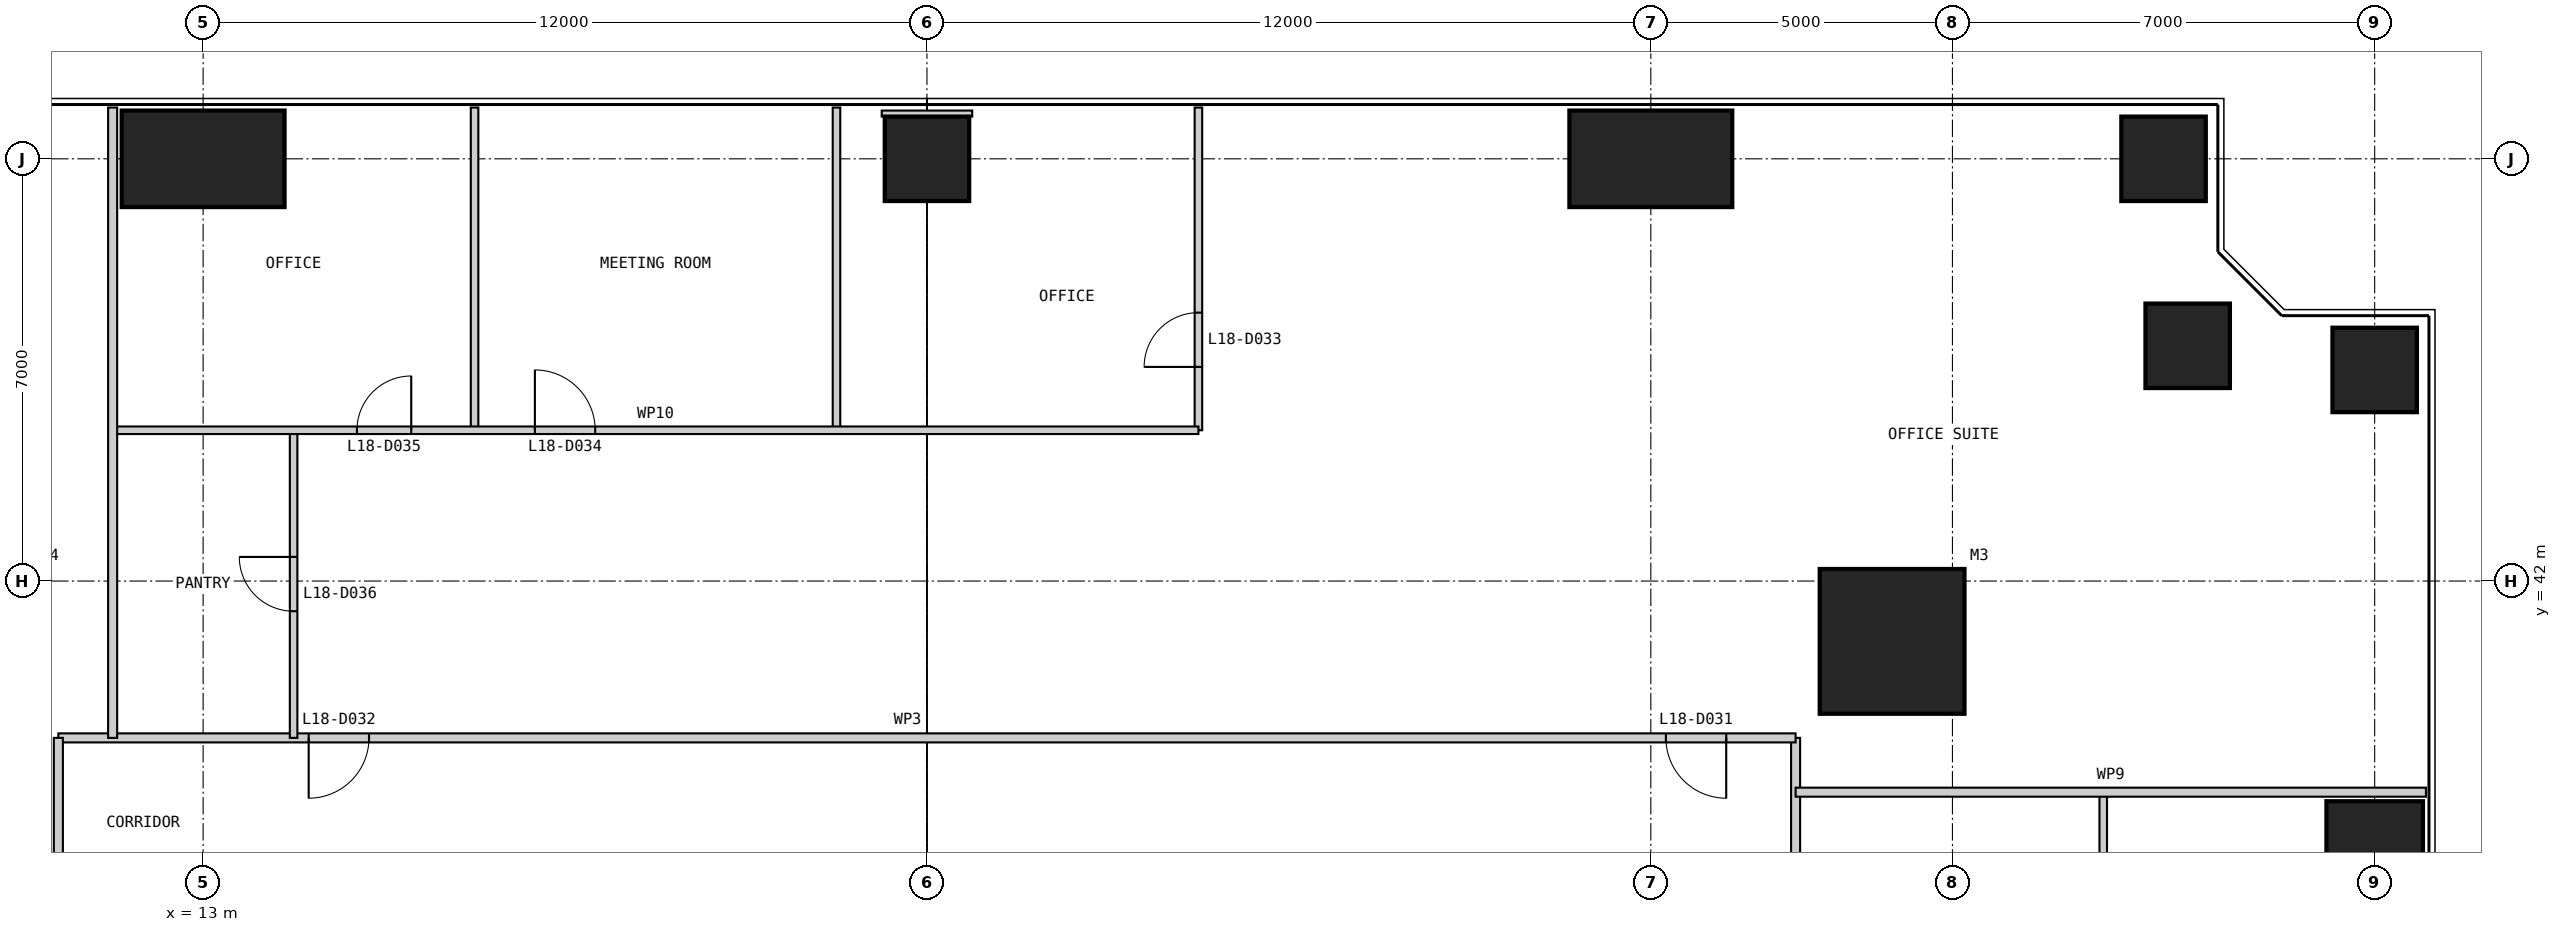
"""IFC4 building model, lengths in metres.
Left out: names, types, materials, properties, quantities, classifications, styles, units other than length and angle.
Written with IfcOpenShell. Run it as: python <this file> out.ifc"""

import sys

from ifc_helpers import new_model, si_unit, direction, frame, frame_2d, origin, origin_2d, place, context, subcontext, project, spatial, rectangle, extrude, element, fill, save


model = new_model("IFC4")
c1 = context("Model", 3, precision=1e-05, world=origin(), true_north=direction((0.0, 1.0)))
c2 = subcontext(c1, "Body", "Model", "MODEL_VIEW")
j1 = project(units=[si_unit("LENGTHUNIT", "METRE"), si_unit("PLANEANGLEUNIT", "RADIAN")], contexts=[c1])
p1 = place(None, origin())
s1 = spatial("IfcSite", under=j1, at=p1, CompositionType="ELEMENT")
p2 = place(p1, origin())
s2 = spatial("IfcBuilding", under=s1, at=p2, CompositionType="ELEMENT")
p3 = place(p2, frame((0.0, 0.0, 79.0)))
s3 = spatial("IfcBuildingStorey", under=s2, at=p3, CompositionType="ELEMENT", Elevation=79.0)
p4 = place(p3, frame((41.0, 41.0, 0.0), z_axis=(0.0, 0.0, 1.0), x_axis=(1.0, 0.0, 0.0)))
e1 = element("IfcColumn", 1, at=p4, inside=s3, PredefinedType="COLUMN", context=c2, shape_type="SweptSolid", body=[
    extrude(rectangle(XDim=2.4, YDim=2.4, at=origin_2d()), origin(), (0.0, 0.0, 1.0), 4.0),
])
p5 = place(p3, frame((49.0, 37.0, 0.0), z_axis=(0.0, 0.0, 1.0), x_axis=(1.0, 0.0, 0.0)))
e2 = element("IfcColumn", 2, at=p5, inside=s3, PredefinedType="COLUMN", context=c2, shape_type="SweptSolid", body=[
    extrude(rectangle(XDim=1.6, YDim=2.7, at=origin_2d()), origin(), (0.0, 0.0, 1.0), 4.0),
])
for number, where, z_axis, x_axis in (
    (3, (49.0, 45.5, 0.0), (0.0, 0.0, 1.0), (1.0, 0.0, 0.0)),
    (4, (45.9, 45.9, 0.0), (0.0, 0.0, 1.0), (1.0, 0.0, 0.0)),
    (5, (45.5, 49.0, 0.0), (0.0, 0.0, 1.0), (1.0, 0.0, 0.0)),
):
    element("IfcColumn", number, at=place(p3, frame(where, z_axis=z_axis, x_axis=x_axis)), inside=s3, PredefinedType="COLUMN", context=c2, shape_type="SweptSolid", body=[
        extrude(rectangle(XDim=1.4, YDim=1.4, at=origin_2d()), origin(), (0.0, 0.0, 1.0), 4.0),
    ])
p6 = place(p3, frame((37.0, 49.0, 0.0), z_axis=(0.0, 0.0, 1.0), x_axis=(1.0, 0.0, 0.0)))
e6 = element("IfcColumn", 6, at=p6, inside=s3, PredefinedType="COLUMN", context=c2, shape_type="SweptSolid", body=[
    extrude(rectangle(XDim=2.7, YDim=1.6, at=origin_2d()), origin(), (0.0, 0.0, 1.0), 4.0),
])
p7 = place(p3, frame((25.0, 49.0, 0.0), z_axis=(0.0, 0.0, 1.0), x_axis=(1.0, 0.0, 0.0)))
e7 = element("IfcColumn", 7, at=p7, inside=s3, PredefinedType="COLUMN", context=c2, shape_type="SweptSolid", body=[
    extrude(rectangle(XDim=1.4, YDim=1.4, at=origin_2d()), origin(), (0.0, 0.0, 1.0), 4.0),
])
p8 = place(p3, frame((13.0, 49.0, 0.0), z_axis=(0.0, 0.0, 1.0), x_axis=(1.0, 0.0, 0.0)))
e8 = element("IfcColumn", 8, at=p8, inside=s3, PredefinedType="COLUMN", context=c2, shape_type="SweptSolid", body=[
    extrude(rectangle(XDim=2.7, YDim=1.6, at=origin_2d()), origin(), (0.0, 0.0, 1.0), 4.0),
])
p9 = place(p3, frame((39.4, 11.5, 0.0), z_axis=(0.0, 0.0, 1.0), x_axis=(0.0, 1.0, 0.0)))
e9 = element("IfcWall", 9, at=p9, inside=s3, PredefinedType="PARTITIONING", context=c2, shape_type="SweptSolid", body=[
    extrude(rectangle(XDim=27.9, YDim=0.15, at=frame_2d((13.95, 0.0))), origin(), (0.0, 0.0, 1.0), 3.85),
])
p10 = place(p9, frame((0.25, 0.0, 0.0)))
e10 = element("IfcOpeningElement", 10, at=p10, cuts=e9, PredefinedType="OPENING", context=c2, shape_type="SweptSolid", body=[
    extrude(rectangle(XDim=1.0, YDim=2.2, at=frame_2d((0.5, 1.1))), frame((0.0, 0.085, 0.0), z_axis=(0.0, -1.0, 0.0), x_axis=(1.0, 0.0, 0.0)), (0.0, 0.0, 1.0), 0.17),
])
p11 = place(p9, frame((22.75, 0.0, 0.0)))
e11 = element("IfcOpeningElement", 11, at=p11, cuts=e9, PredefinedType="OPENING", context=c2, shape_type="SweptSolid", body=[
    extrude(rectangle(XDim=1.0, YDim=2.2, at=frame_2d((0.5, 1.1))), frame((0.0, 0.085, 0.0), z_axis=(0.0, -1.0, 0.0), x_axis=(1.0, 0.0, 0.0)), (0.0, 0.0, 1.0), 0.17),
])
p12 = place(p3, frame((44.5, 20.5, 0.0), z_axis=(0.0, 0.0, 1.0), x_axis=(0.0, 1.0, 0.0)))
e12 = element("IfcWall", 12, at=p12, inside=s3, PredefinedType="PARTITIONING", context=c2, shape_type="SweptSolid", body=[
    extrude(rectangle(XDim=18.0, YDim=0.125, at=frame_2d((9.0, 0.0))), origin(), (0.0, 0.0, 1.0), 3.85),
])
p13 = place(p12, frame((10.0, 0.0, 0.0)))
e13 = element("IfcOpeningElement", 13, at=p13, cuts=e12, PredefinedType="OPENING", context=c2, shape_type="SweptSolid", body=[
    extrude(rectangle(XDim=1.0, YDim=2.2, at=frame_2d((0.5, 1.1))), frame((0.0, 0.073, 0.0), z_axis=(0.0, -1.0, 0.0), x_axis=(1.0, 0.0, 0.0)), (0.0, 0.0, 1.0), 0.145),
])
p14 = place(p12, frame((13.05, 0.0, 0.0)))
e14 = element("IfcOpeningElement", 14, at=p14, cuts=e12, PredefinedType="OPENING", context=c2, shape_type="SweptSolid", body=[
    extrude(rectangle(XDim=0.9, YDim=2.2, at=frame_2d((0.45, 1.1))), frame((0.0, 0.073, 0.0), z_axis=(0.0, -1.0, 0.0), x_axis=(1.0, 0.0, 0.0)), (0.0, 0.0, 1.0), 0.145),
])
p15 = place(p3, frame((39.4, 39.4, 0.0), z_axis=(0.0, 0.0, 1.0), x_axis=(-1.0, 0.0, 0.0)))
e15 = element("IfcWall", 15, at=p15, inside=s3, PredefinedType="PARTITIONING", context=c2, shape_type="SweptSolid", body=[
    extrude(rectangle(XDim=28.8, YDim=0.15, at=frame_2d((14.4, 0.0))), origin(), (0.0, 0.0, 1.0), 3.85),
])
p16 = place(p15, frame((1.15, 0.0, 0.0)))
e16 = element("IfcOpeningElement", 16, at=p16, cuts=e15, PredefinedType="OPENING", context=c2, shape_type="SweptSolid", body=[
    extrude(rectangle(XDim=1.0, YDim=2.2, at=frame_2d((0.5, 1.1))), frame((0.0, 0.085, 0.0), z_axis=(0.0, -1.0, 0.0), x_axis=(1.0, 0.0, 0.0)), (0.0, 0.0, 1.0), 0.17),
])
p17 = place(p15, frame((23.65, 0.0, 0.0)))
e17 = element("IfcOpeningElement", 17, at=p17, cuts=e15, PredefinedType="OPENING", context=c2, shape_type="SweptSolid", body=[
    extrude(rectangle(XDim=1.0, YDim=2.2, at=frame_2d((0.5, 1.1))), frame((0.0, 0.085, 0.0), z_axis=(0.0, -1.0, 0.0), x_axis=(1.0, 0.0, 0.0)), (0.0, 0.0, 1.0), 0.17),
])
p18 = place(p3, frame((49.85, 38.5, 0.0), z_axis=(0.0, 0.0, 1.0), x_axis=(-1.0, 0.0, 0.0)))
e18 = element("IfcWall", 18, at=p18, inside=s3, PredefinedType="PARTITIONING", context=c2, shape_type="SweptSolid", body=[
    extrude(rectangle(XDim=10.45, YDim=0.15, at=frame_2d((5.225, 0.0))), origin(), (0.0, 0.0, 1.0), 3.85),
])
p19 = place(p3, frame((29.5, 49.85, 0.0), z_axis=(0.0, 0.0, 1.0), x_axis=(0.0, -1.0, 0.0)))
e19 = element("IfcWall", 19, at=p19, inside=s3, PredefinedType="PARTITIONING", context=c2, shape_type="SweptSolid", body=[
    extrude(rectangle(XDim=5.35, YDim=0.125, at=frame_2d((2.675, 0.0))), origin(), (0.0, 0.0, 1.0), 3.85),
])
p20 = place(p19, frame((3.4, 0.0, 0.0)))
e20 = element("IfcOpeningElement", 20, at=p20, cuts=e19, PredefinedType="OPENING", context=c2, shape_type="SweptSolid", body=[
    extrude(rectangle(XDim=0.9, YDim=2.2, at=frame_2d((0.45, 1.1))), frame((0.0, 0.073, 0.0), z_axis=(0.0, -1.0, 0.0), x_axis=(1.0, 0.0, 0.0)), (0.0, 0.0, 1.0), 0.145),
])
for number, where, z_axis, x_axis in (
    (21, (23.5, 49.85, 0.0), (0.0, 0.0, 1.0), (0.0, -1.0, 0.0)),
    (22, (17.5, 49.85, 0.0), (0.0, 0.0, 1.0), (0.0, -1.0, 0.0)),
):
    element("IfcWall", number, at=place(p3, frame(where, z_axis=z_axis, x_axis=x_axis)), inside=s3, PredefinedType="PARTITIONING", context=c2, shape_type="SweptSolid", body=[
        extrude(rectangle(XDim=5.35, YDim=0.125, at=frame_2d((2.675, 0.0))), origin(), (0.0, 0.0, 1.0), 3.85),
    ])
p21 = place(p3, frame((14.5, 44.5, 0.0), z_axis=(0.0, 0.0, 1.0), x_axis=(0.0, -1.0, 0.0)))
e23 = element("IfcWall", 23, at=p21, inside=s3, PredefinedType="PARTITIONING", context=c2, shape_type="SweptSolid", body=[
    extrude(rectangle(XDim=5.1, YDim=0.125, at=frame_2d((2.55, 0.0))), origin(), (0.0, 0.0, 1.0), 3.85),
])
p22 = place(p21, frame((2.1, 0.0, 0.0)))
e24 = element("IfcOpeningElement", 24, at=p22, cuts=e23, PredefinedType="OPENING", context=c2, shape_type="SweptSolid", body=[
    extrude(rectangle(XDim=0.9, YDim=2.2, at=frame_2d((0.45, 1.1))), frame((0.0, 0.073, 0.0), z_axis=(0.0, -1.0, 0.0), x_axis=(1.0, 0.0, 0.0)), (0.0, 0.0, 1.0), 0.145),
])
p23 = place(p3, frame((29.5, 44.5, 0.0), z_axis=(0.0, 0.0, 1.0), x_axis=(-1.0, 0.0, 0.0)))
e25 = element("IfcWall", 25, at=p23, inside=s3, PredefinedType="PARTITIONING", context=c2, shape_type="SweptSolid", body=[
    extrude(rectangle(XDim=18.0, YDim=0.125, at=frame_2d((9.0, 0.0))), origin(), (0.0, 0.0, 1.0), 3.85),
])
p24 = place(p23, frame((10.0, 0.0, 0.0)))
e26 = element("IfcOpeningElement", 26, at=p24, cuts=e25, PredefinedType="OPENING", context=c2, shape_type="SweptSolid", body=[
    extrude(rectangle(XDim=1.0, YDim=2.2, at=frame_2d((0.5, 1.1))), frame((0.0, 0.073, 0.0), z_axis=(0.0, -1.0, 0.0), x_axis=(1.0, 0.0, 0.0)), (0.0, 0.0, 1.0), 0.145),
])
p25 = place(p23, frame((13.05, 0.0, 0.0)))
e27 = element("IfcOpeningElement", 27, at=p25, cuts=e25, PredefinedType="OPENING", context=c2, shape_type="SweptSolid", body=[
    extrude(rectangle(XDim=0.9, YDim=2.2, at=frame_2d((0.45, 1.1))), frame((0.0, 0.073, 0.0), z_axis=(0.0, -1.0, 0.0), x_axis=(1.0, 0.0, 0.0)), (0.0, 0.0, 1.0), 0.145),
])
p26 = place(p3, frame((10.6, 39.4, 0.0), z_axis=(0.0, 0.0, 1.0), x_axis=(0.0, -1.0, 0.0)))
e28 = element("IfcWall", 28, at=p26, inside=s3, PredefinedType="PARTITIONING", context=c2, shape_type="SweptSolid", body=[
    extrude(rectangle(XDim=27.9, YDim=0.15, at=frame_2d((13.95, 0.0))), origin(), (0.0, 0.0, 1.0), 3.85),
])
p27 = place(p26, frame((3.4, 0.0, 0.0)))
e29 = element("IfcOpeningElement", 29, at=p27, cuts=e28, PredefinedType="OPENING", context=c2, shape_type="SweptSolid", body=[
    extrude(rectangle(XDim=1.0, YDim=2.2, at=frame_2d((0.5, 1.1))), frame((0.0, 0.085, 0.0), z_axis=(0.0, -1.0, 0.0), x_axis=(1.0, 0.0, 0.0)), (0.0, 0.0, 1.0), 0.17),
])
p28 = place(p26, frame((10.15, 0.0, 0.0)))
e30 = element("IfcOpeningElement", 30, at=p28, cuts=e28, PredefinedType="OPENING", context=c2, shape_type="SweptSolid", body=[
    extrude(rectangle(XDim=1.0, YDim=2.2, at=frame_2d((0.5, 1.1))), frame((0.0, 0.085, 0.0), z_axis=(0.0, -1.0, 0.0), x_axis=(1.0, 0.0, 0.0)), (0.0, 0.0, 1.0), 0.17),
])
p29 = place(p26, frame((17.65, 0.0, 0.0)))
e31 = element("IfcOpeningElement", 31, at=p29, cuts=e28, PredefinedType="OPENING", context=c2, shape_type="SweptSolid", body=[
    extrude(rectangle(XDim=1.0, YDim=2.2, at=frame_2d((0.5, 1.1))), frame((0.0, 0.085, 0.0), z_axis=(0.0, -1.0, 0.0), x_axis=(1.0, 0.0, 0.0)), (0.0, 0.0, 1.0), 0.17),
])
p30 = place(p26, frame((24.4, 0.0, 0.0)))
e32 = element("IfcOpeningElement", 32, at=p30, cuts=e28, PredefinedType="OPENING", context=c2, shape_type="SweptSolid", body=[
    extrude(rectangle(XDim=1.0, YDim=2.2, at=frame_2d((0.5, 1.1))), frame((0.0, 0.085, 0.0), z_axis=(0.0, -1.0, 0.0), x_axis=(1.0, 0.0, 0.0)), (0.0, 0.0, 1.0), 0.17),
])
p31 = place(p3, frame((11.5, 49.85, 0.0), z_axis=(0.0, 0.0, 1.0), x_axis=(0.0, -1.0, 0.0)))
e33 = element("IfcWall", 33, at=p31, inside=s3, PredefinedType="PARTITIONING", context=c2, shape_type="SweptSolid", body=[
    extrude(rectangle(XDim=10.45, YDim=0.15, at=frame_2d((5.225, 0.0))), origin(), (0.0, 0.0, 1.0), 3.85),
])
p32 = place(p3, frame((25.0, 49.8, 0.0), z_axis=(0.0, 0.0, 1.0), x_axis=(0.0, -1.0, 0.0)))
e34 = element("IfcWall", 34, at=p32, inside=s3, PredefinedType="PARTITIONING", context=c2, shape_type="SweptSolid", body=[
    extrude(rectangle(XDim=0.1, YDim=1.5, at=frame_2d((0.05, 0.0))), origin(), (0.0, 0.0, 1.0), 3.85),
])
p33 = place(p16, origin())
e35 = element("IfcDoor", 35, at=p33, inside=s3, OperationType="SINGLE_SWING_LEFT", PredefinedType="DOOR", context=c2, shape_type="SweptSolid", body=[
    extrude(rectangle(XDim=1.0, YDim=2.2, at=frame_2d((0.5, 1.1))), frame((0.0, 0.025, 0.0), z_axis=(0.0, -1.0, 0.0), x_axis=(1.0, 0.0, 0.0)), (0.0, 0.0, 1.0), 0.05),
])
fill(e16, e35)
p34 = place(p17, origin())
e36 = element("IfcDoor", 36, at=p34, inside=s3, OperationType="SINGLE_SWING_RIGHT", PredefinedType="DOOR", context=c2, shape_type="SweptSolid", body=[
    extrude(rectangle(XDim=1.0, YDim=2.2, at=frame_2d((0.5, 1.1))), frame((0.0, 0.025, 0.0), z_axis=(0.0, -1.0, 0.0), x_axis=(1.0, 0.0, 0.0)), (0.0, 0.0, 1.0), 0.05),
])
fill(e17, e36)
p35 = place(p20, frame((0.9, 0.0, 0.0), z_axis=(0.0, 0.0, 1.0), x_axis=(-1.0, 0.0, 0.0)))
e37 = element("IfcDoor", 37, at=p35, inside=s3, OperationType="SINGLE_SWING_LEFT", PredefinedType="DOOR", context=c2, shape_type="SweptSolid", body=[
    extrude(rectangle(XDim=0.9, YDim=2.2, at=frame_2d((0.45, 1.1))), frame((0.0, 0.025, 0.0), z_axis=(0.0, -1.0, 0.0), x_axis=(1.0, 0.0, 0.0)), (0.0, 0.0, 1.0), 0.05),
])
fill(e20, e37)
p36 = place(p24, frame((1.0, 0.0, 0.0), z_axis=(0.0, 0.0, 1.0), x_axis=(-1.0, 0.0, 0.0)))
e38 = element("IfcDoor", 38, at=p36, inside=s3, OperationType="SINGLE_SWING_LEFT", PredefinedType="DOOR", context=c2, shape_type="SweptSolid", body=[
    extrude(rectangle(XDim=1.0, YDim=2.2, at=frame_2d((0.5, 1.1))), frame((0.0, 0.025, 0.0), z_axis=(0.0, -1.0, 0.0), x_axis=(1.0, 0.0, 0.0)), (0.0, 0.0, 1.0), 0.05),
])
fill(e26, e38)
p37 = place(p25, frame((0.9, 0.0, 0.0), z_axis=(0.0, 0.0, 1.0), x_axis=(-1.0, 0.0, 0.0)))
e39 = element("IfcDoor", 39, at=p37, inside=s3, OperationType="SINGLE_SWING_RIGHT", PredefinedType="DOOR", context=c2, shape_type="SweptSolid", body=[
    extrude(rectangle(XDim=0.9, YDim=2.2, at=frame_2d((0.45, 1.1))), frame((0.0, 0.025, 0.0), z_axis=(0.0, -1.0, 0.0), x_axis=(1.0, 0.0, 0.0)), (0.0, 0.0, 1.0), 0.05),
])
fill(e27, e39)
p38 = place(p22, frame((0.9, 0.0, 0.0), z_axis=(0.0, 0.0, 1.0), x_axis=(-1.0, 0.0, 0.0)))
e40 = element("IfcDoor", 40, at=p38, inside=s3, OperationType="SINGLE_SWING_RIGHT", PredefinedType="DOOR", context=c2, shape_type="SweptSolid", body=[
    extrude(rectangle(XDim=0.9, YDim=2.2, at=frame_2d((0.45, 1.1))), frame((0.0, 0.025, 0.0), z_axis=(0.0, -1.0, 0.0), x_axis=(1.0, 0.0, 0.0)), (0.0, 0.0, 1.0), 0.05),
])
fill(e24, e40)
save(model, sys.argv[1])
